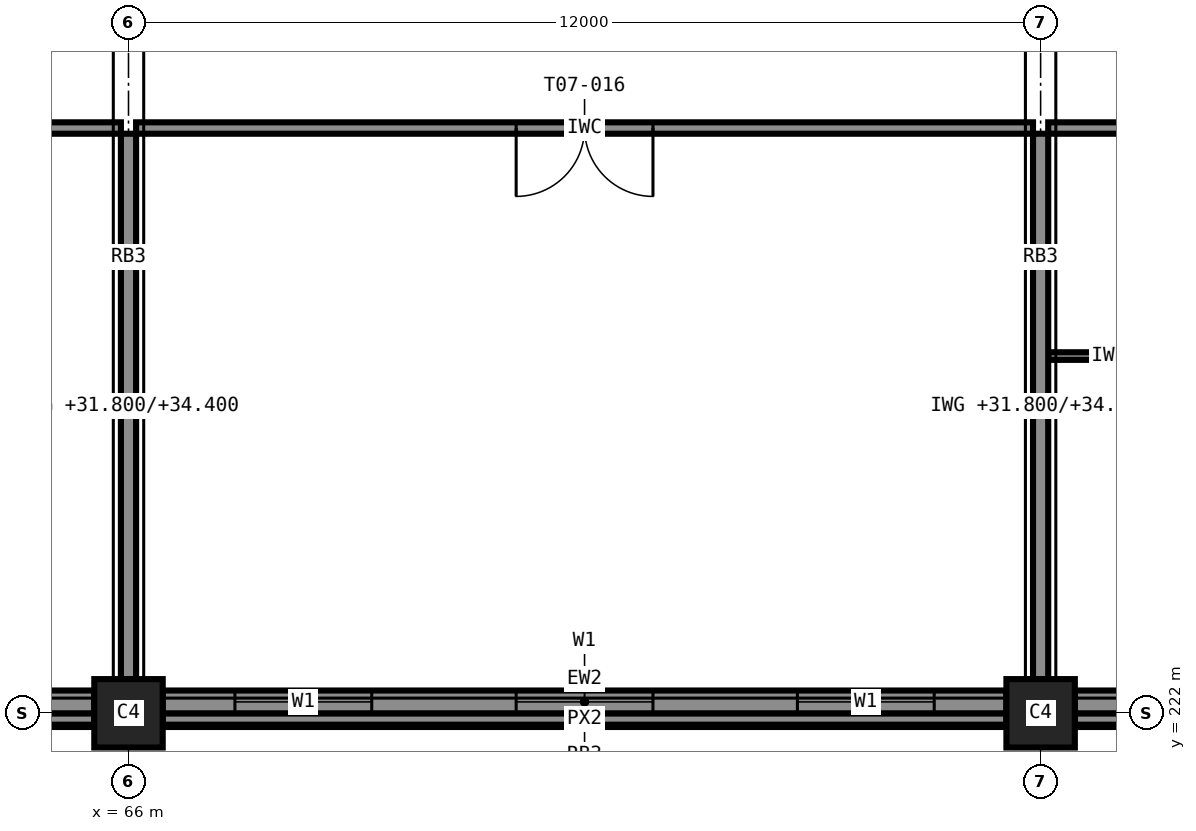
"""IFC4 building model, lengths in metres.
Left out: names, types, materials, properties, quantities, classifications, styles, units other than length and angle.
Written with IfcOpenShell. Run it as: python <this file> out.ifc"""

import sys

from ifc_helpers import new_model, si_unit, direction, frame, frame_2d, origin, origin_2d, place, context, subcontext, project, spatial, rectangle, extrude, element, fill, save


model = new_model("IFC4")
c1 = context("Model", 3, precision=1e-05, world=origin(), true_north=direction((0.0, 1.0)))
c2 = subcontext(c1, "Body", "Model", "MODEL_VIEW")
j1 = project(units=[si_unit("LENGTHUNIT", "METRE"), si_unit("PLANEANGLEUNIT", "RADIAN")], contexts=[c1])
p1 = place(None, origin())
s1 = spatial("IfcSite", under=j1, at=p1, CompositionType="ELEMENT")
p2 = place(p1, origin())
s2 = spatial("IfcBuilding", under=s1, at=p2, CompositionType="ELEMENT")
p3 = place(p2, frame((0.0, 0.0, 31.8)))
s3 = spatial("IfcBuildingStorey", under=s2, at=p3, CompositionType="ELEMENT", Elevation=31.8)
for number, where, z_axis, x_axis in (
    (1, (66.0, 222.0, 0.0), (0.0, 0.0, 1.0), (1.0, 0.0, 0.0)),
    (2, (78.0, 222.0, 0.0), (0.0, 0.0, 1.0), (1.0, 0.0, 0.0)),
):
    element("IfcColumn", number, at=place(p3, frame(where, z_axis=z_axis, x_axis=x_axis)), inside=s3, PredefinedType="COLUMN", context=c2, shape_type="SweptSolid", body=[
        extrude(rectangle(XDim=0.9, YDim=0.9, at=origin_2d()), origin(), (0.0, 0.0, 1.0), 3.6),
    ])
p4 = place(p3, frame((54.45, 222.15, 0.0), z_axis=(0.0, 0.0, 1.0), x_axis=(1.0, 0.0, 0.0)))
e3 = element("IfcWall", 3, at=p4, inside=s3, PredefinedType="STANDARD", context=c2, shape_type="SweptSolid", body=[
    extrude(rectangle(XDim=11.1, YDim=0.3, at=frame_2d((5.55, 0.0))), origin(), (0.0, 0.0, 1.0), 2.6),
])
p5 = place(p4, frame((1.875, 0.0, 0.85)))
e4 = element("IfcOpeningElement", 4, at=p5, cuts=e3, PredefinedType="OPENING", context=c2, shape_type="SweptSolid", body=[
    extrude(rectangle(XDim=1.8, YDim=1.75, at=frame_2d((0.9, 0.875))), frame((0.0, 0.16, 0.0), z_axis=(0.0, -1.0, 0.0), x_axis=(1.0, 0.0, 0.0)), (0.0, 0.0, 1.0), 0.32),
])
p6 = place(p4, frame((7.425, 0.0, 0.85)))
e5 = element("IfcOpeningElement", 5, at=p6, cuts=e3, PredefinedType="OPENING", context=c2, shape_type="SweptSolid", body=[
    extrude(rectangle(XDim=1.8, YDim=1.75, at=frame_2d((0.9, 0.875))), frame((0.0, 0.16, 0.0), z_axis=(0.0, -1.0, 0.0), x_axis=(1.0, 0.0, 0.0)), (0.0, 0.0, 1.0), 0.32),
])
p7 = place(p3, frame((66.45, 222.15, 0.0), z_axis=(0.0, 0.0, 1.0), x_axis=(1.0, 0.0, 0.0)))
e6 = element("IfcWall", 6, at=p7, inside=s3, PredefinedType="STANDARD", context=c2, shape_type="SweptSolid", body=[
    extrude(rectangle(XDim=11.1, YDim=0.3, at=frame_2d((5.55, 0.0))), origin(), (0.0, 0.0, 1.0), 2.6),
])
p8 = place(p7, frame((0.95, 0.0, 0.85)))
e7 = element("IfcOpeningElement", 7, at=p8, cuts=e6, PredefinedType="OPENING", context=c2, shape_type="SweptSolid", body=[
    extrude(rectangle(XDim=1.8, YDim=1.75, at=frame_2d((0.9, 0.875))), frame((0.0, 0.16, 0.0), z_axis=(0.0, -1.0, 0.0), x_axis=(1.0, 0.0, 0.0)), (0.0, 0.0, 1.0), 0.32),
])
p9 = place(p7, frame((4.65, 0.0, 0.85)))
e8 = element("IfcOpeningElement", 8, at=p9, cuts=e6, PredefinedType="OPENING", context=c2, shape_type="SweptSolid", body=[
    extrude(rectangle(XDim=1.8, YDim=1.75, at=frame_2d((0.9, 0.875))), frame((0.0, 0.16, 0.0), z_axis=(0.0, -1.0, 0.0), x_axis=(1.0, 0.0, 0.0)), (0.0, 0.0, 1.0), 0.32),
])
p10 = place(p7, frame((8.35, 0.0, 0.85)))
e9 = element("IfcOpeningElement", 9, at=p10, cuts=e6, PredefinedType="OPENING", context=c2, shape_type="SweptSolid", body=[
    extrude(rectangle(XDim=1.8, YDim=1.75, at=frame_2d((0.9, 0.875))), frame((0.0, 0.16, 0.0), z_axis=(0.0, -1.0, 0.0), x_axis=(1.0, 0.0, 0.0)), (0.0, 0.0, 1.0), 0.32),
])
p11 = place(p3, frame((78.45, 222.15, 0.0), z_axis=(0.0, 0.0, 1.0), x_axis=(1.0, 0.0, 0.0)))
e10 = element("IfcWall", 10, at=p11, inside=s3, PredefinedType="STANDARD", context=c2, shape_type="SweptSolid", body=[
    extrude(rectangle(XDim=11.1, YDim=0.3, at=frame_2d((5.55, 0.0))), origin(), (0.0, 0.0, 1.0), 2.6),
])
p12 = place(p11, frame((0.875, 0.0, 0.85)))
e11 = element("IfcOpeningElement", 11, at=p12, cuts=e10, PredefinedType="OPENING", context=c2, shape_type="SweptSolid", body=[
    extrude(rectangle(XDim=1.8, YDim=1.75, at=frame_2d((0.9, 0.875))), frame((0.0, 0.16, 0.0), z_axis=(0.0, -1.0, 0.0), x_axis=(1.0, 0.0, 0.0)), (0.0, 0.0, 1.0), 0.32),
])
p13 = place(p11, frame((4.65, 0.0, 0.85)))
e12 = element("IfcOpeningElement", 12, at=p13, cuts=e10, PredefinedType="OPENING", context=c2, shape_type="SweptSolid", body=[
    extrude(rectangle(XDim=1.8, YDim=1.75, at=frame_2d((0.9, 0.875))), frame((0.0, 0.16, 0.0), z_axis=(0.0, -1.0, 0.0), x_axis=(1.0, 0.0, 0.0)), (0.0, 0.0, 1.0), 0.32),
])
for number, where, z_axis, x_axis in (
    (13, (54.45, 221.925, 3.4), (0.0, 0.0, 1.0), (1.0, 0.0, 0.0)),
    (14, (66.45, 221.925, 3.4), (0.0, 0.0, 1.0), (1.0, 0.0, 0.0)),
    (15, (78.45, 221.925, 3.4), (0.0, 0.0, 1.0), (1.0, 0.0, 0.0)),
):
    element("IfcWall", number, at=place(p3, frame(where, z_axis=z_axis, x_axis=x_axis)), inside=s3, PredefinedType="STANDARD", context=c2, shape_type="SweptSolid", body=[
        extrude(rectangle(XDim=11.1, YDim=0.15, at=frame_2d((5.55, 0.0))), origin(), (0.0, 0.0, 1.0), 0.2),
    ])
p14 = place(p3, frame((65.9, 229.7, 0.0), z_axis=(0.0, 0.0, 1.0), x_axis=(-1.0, 0.0, 0.0)))
e16 = element("IfcWall", 16, at=p14, inside=s3, PredefinedType="PARTITIONING", context=c2, shape_type="SweptSolid", body=[
    extrude(rectangle(XDim=5.8, YDim=0.15, at=frame_2d((2.9, 0.0))), origin(), (0.0, 0.0, 1.0), 3.4),
])
p15 = place(p14, frame((1.2, 0.0, 0.0)))
e17 = element("IfcOpeningElement", 17, at=p15, cuts=e16, PredefinedType="OPENING", context=c2, shape_type="SweptSolid", body=[
    extrude(rectangle(XDim=1.0, YDim=2.1, at=frame_2d((0.5, 1.05))), frame((0.0, 0.085, 0.0), z_axis=(0.0, -1.0, 0.0), x_axis=(1.0, 0.0, 0.0)), (0.0, 0.0, 1.0), 0.17),
])
p16 = place(p3, frame((77.9, 229.7, 0.0), z_axis=(0.0, 0.0, 1.0), x_axis=(-1.0, 0.0, 0.0)))
e18 = element("IfcWall", 18, at=p16, inside=s3, PredefinedType="PARTITIONING", context=c2, shape_type="SweptSolid", body=[
    extrude(rectangle(XDim=11.8, YDim=0.15, at=frame_2d((5.9, 0.0))), origin(), (0.0, 0.0, 1.0), 3.4),
])
p17 = place(p16, frame((5.0, 0.0, 0.0)))
e19 = element("IfcOpeningElement", 19, at=p17, cuts=e18, PredefinedType="OPENING", context=c2, shape_type="SweptSolid", body=[
    extrude(rectangle(XDim=1.8, YDim=2.1, at=frame_2d((0.9, 1.05))), frame((0.0, 0.085, 0.0), z_axis=(0.0, -1.0, 0.0), x_axis=(1.0, 0.0, 0.0)), (0.0, 0.0, 1.0), 0.17),
])
p18 = place(p3, frame((81.9, 229.7, 0.0), z_axis=(0.0, 0.0, 1.0), x_axis=(-1.0, 0.0, 0.0)))
e20 = element("IfcWall", 20, at=p18, inside=s3, PredefinedType="PARTITIONING", context=c2, shape_type="SweptSolid", body=[
    extrude(rectangle(XDim=3.8, YDim=0.15, at=frame_2d((1.9, 0.0))), origin(), (0.0, 0.0, 1.0), 3.4),
])
p19 = place(p18, frame((0.55, 0.0, 0.0)))
e21 = element("IfcOpeningElement", 21, at=p19, cuts=e20, PredefinedType="OPENING", context=c2, shape_type="SweptSolid", body=[
    extrude(rectangle(XDim=1.0, YDim=2.1, at=frame_2d((0.5, 1.05))), frame((0.0, 0.085, 0.0), z_axis=(0.0, -1.0, 0.0), x_axis=(1.0, 0.0, 0.0)), (0.0, 0.0, 1.0), 0.17),
])
p20 = place(p3, frame((78.1, 226.7, 0.0), z_axis=(0.0, 0.0, 1.0), x_axis=(1.0, 0.0, 0.0)))
e22 = element("IfcWall", 22, at=p20, inside=s3, PredefinedType="PARTITIONING", context=c2, shape_type="SweptSolid", body=[
    extrude(rectangle(XDim=1.6, YDim=0.1, at=frame_2d((0.8, 0.0))), origin(), (0.0, 0.0, 1.0), 3.4),
])
for number, where, z_axis, x_axis in (
    (23, (66.0, 222.45, 0.0), (0.0, 0.0, 1.0), (0.0, 1.0, 0.0)),
    (24, (78.0, 222.45, 0.0), (0.0, 0.0, 1.0), (0.0, 1.0, 0.0)),
):
    element("IfcWall", number, at=place(p3, frame(where, z_axis=z_axis, x_axis=x_axis)), inside=s3, PredefinedType="PARTITIONING", context=c2, shape_type="SweptSolid", body=[
        extrude(rectangle(XDim=7.175, YDim=0.2, at=frame_2d((3.587, 0.0))), origin(), (0.0, 0.0, 1.0), 2.6),
    ])
p21 = place(p8, origin())
e25 = element("IfcWindow", 25, at=p21, inside=s3, PartitioningType="SINGLE_PANEL", PredefinedType="WINDOW", context=c2, shape_type="SweptSolid", body=[
    extrude(rectangle(XDim=1.8, YDim=1.75, at=frame_2d((0.9, 0.875))), frame((0.0, 0.03, 0.0), z_axis=(0.0, -1.0, 0.0), x_axis=(1.0, 0.0, 0.0)), (0.0, 0.0, 1.0), 0.06),
])
fill(e7, e25)
p22 = place(p9, origin())
e26 = element("IfcWindow", 26, at=p22, inside=s3, PartitioningType="SINGLE_PANEL", PredefinedType="WINDOW", context=c2, shape_type="SweptSolid", body=[
    extrude(rectangle(XDim=1.8, YDim=1.75, at=frame_2d((0.9, 0.875))), frame((0.0, 0.03, 0.0), z_axis=(0.0, -1.0, 0.0), x_axis=(1.0, 0.0, 0.0)), (0.0, 0.0, 1.0), 0.06),
])
fill(e8, e26)
p23 = place(p10, origin())
e27 = element("IfcWindow", 27, at=p23, inside=s3, PartitioningType="SINGLE_PANEL", PredefinedType="WINDOW", context=c2, shape_type="SweptSolid", body=[
    extrude(rectangle(XDim=1.8, YDim=1.75, at=frame_2d((0.9, 0.875))), frame((0.0, 0.03, 0.0), z_axis=(0.0, -1.0, 0.0), x_axis=(1.0, 0.0, 0.0)), (0.0, 0.0, 1.0), 0.06),
])
fill(e9, e27)
p24 = place(p17, origin())
e28 = element("IfcDoor", 28, at=p24, inside=s3, OperationType="DOUBLE_DOOR_SINGLE_SWING", PredefinedType="DOOR", context=c2, shape_type="SweptSolid", body=[
    extrude(rectangle(XDim=1.8, YDim=2.1, at=frame_2d((0.9, 1.05))), frame((0.0, 0.025, 0.0), z_axis=(0.0, -1.0, 0.0), x_axis=(1.0, 0.0, 0.0)), (0.0, 0.0, 1.0), 0.05),
])
fill(e19, e28)
save(model, sys.argv[1])
